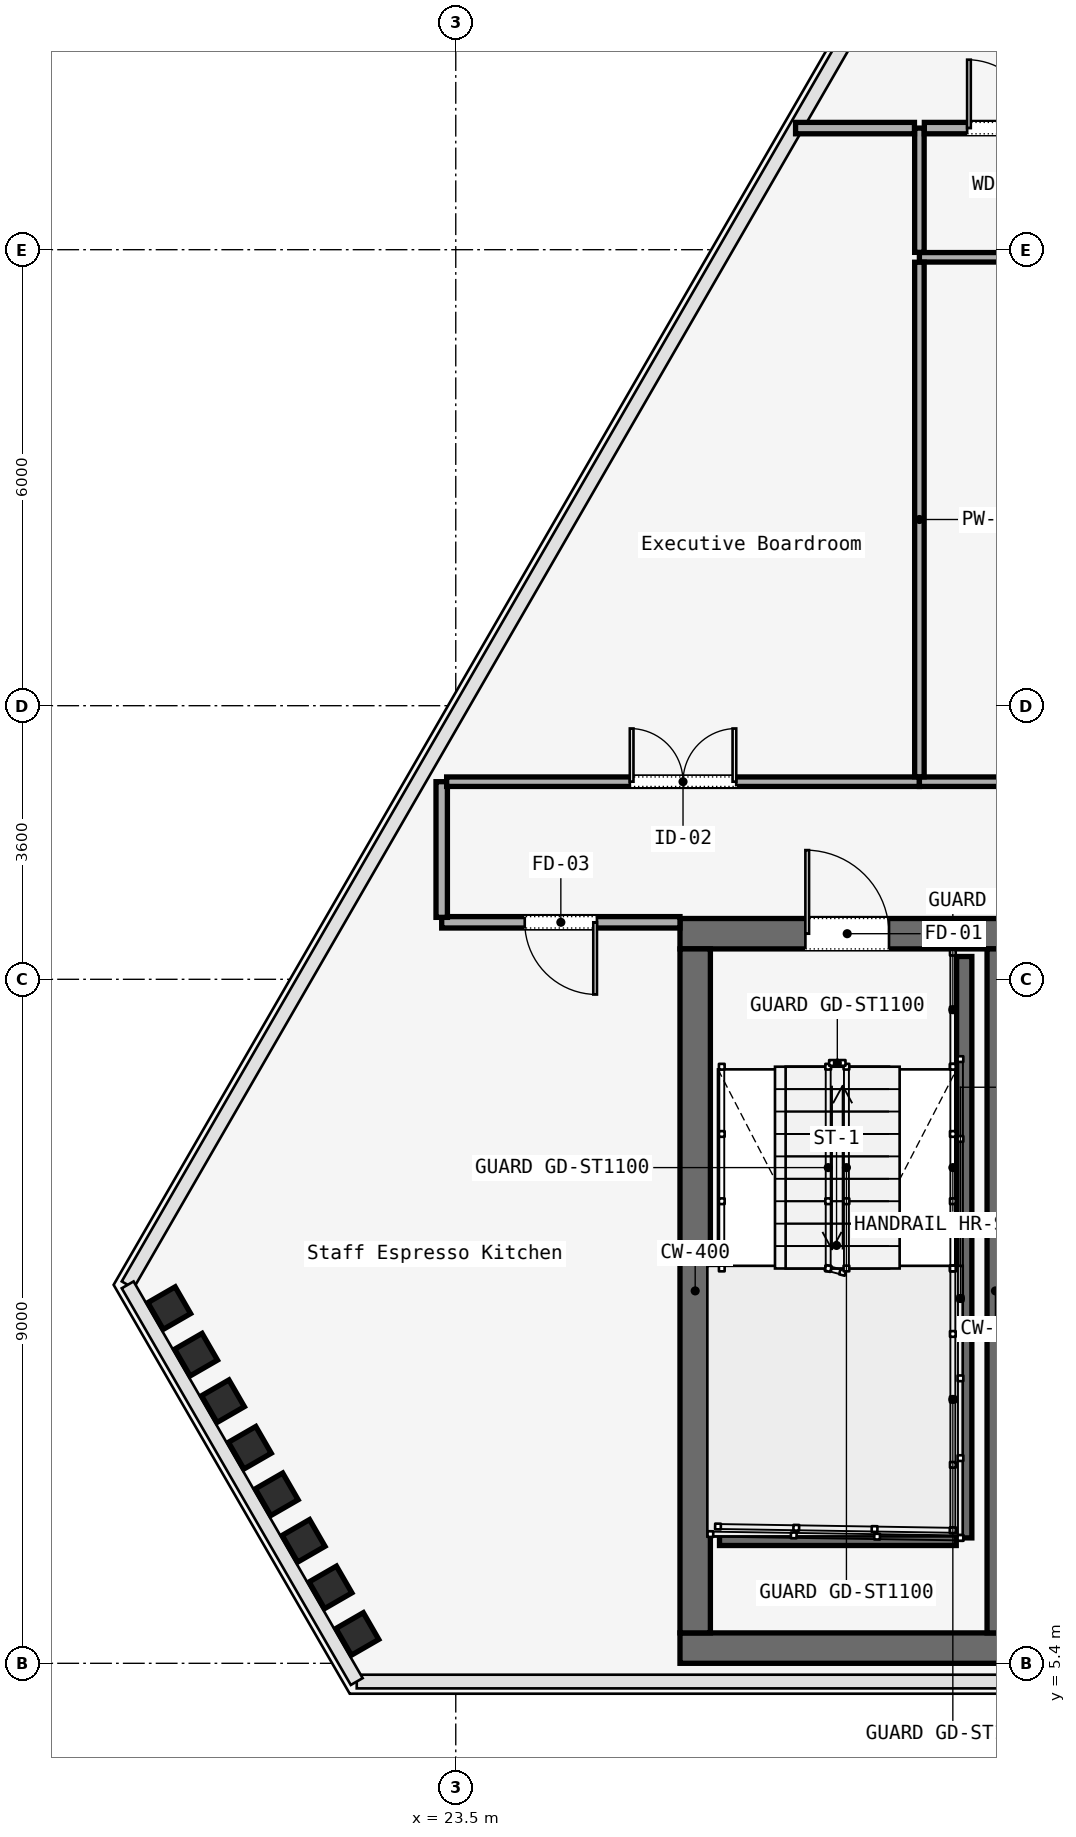
"""IFC4 building model, lengths in metres.
Left out: names, types, materials, properties, quantities, classifications, styles, units other than length and angle.
Written with IfcOpenShell. Run it as: python <this file> out.ifc"""

import sys

from ifc_helpers import new_model, si_unit, direction, frame, frame_2d, origin, origin_2d, place, context, subcontext, project, spatial, rectangle, i_section, extrude, element, fill, save


model = new_model("IFC4")
c1 = context("Model", 3, precision=1e-05, world=origin(), true_north=direction((0.0, 1.0)))
c2 = subcontext(c1, "Body", "Model", "MODEL_VIEW")
j1 = project(units=[si_unit("LENGTHUNIT", "METRE"), si_unit("PLANEANGLEUNIT", "RADIAN")], contexts=[c1])
p1 = place(None, origin())
s1 = spatial("IfcSite", under=j1, at=p1, CompositionType="ELEMENT")
p2 = place(p1, origin())
s2 = spatial("IfcBuilding", under=s1, at=p2, CompositionType="ELEMENT")
p3 = place(p2, frame((0.0, 0.0, 256.0)))
s3 = spatial("IfcBuildingStorey", under=s2, at=p3, CompositionType="ELEMENT", Elevation=256.0)
p4 = place(p3, frame((26.45, 15.0, 0.0), z_axis=(0.0, 0.0, 1.0), x_axis=(1.0, 0.0, 0.0)))
e1 = element("IfcWall", 1, at=p4, inside=s3, PredefinedType="SOLIDWALL", context=c2, shape_type="SweptSolid", body=[
    extrude(rectangle(XDim=31.1, YDim=0.4, at=frame_2d((15.55, 0.0))), origin(), (0.0, 0.0, 1.0), 3.58),
])
p5 = place(p4, frame((1.65, 0.0, 0.0)))
e2 = element("IfcOpeningElement", 2, at=p5, cuts=e1, PredefinedType="OPENING", context=c2, shape_type="SweptSolid", body=[
    extrude(rectangle(XDim=1.1, YDim=2.2, at=frame_2d((0.55, 1.1))), frame((0.0, 0.2, 0.0), z_axis=(0.0, -1.0, 0.0), x_axis=(1.0, 0.0, 0.0)), (0.0, 0.0, 1.0), 0.4),
])
p6 = place(p4, frame((13.65, 0.0, 0.0)))
e3 = element("IfcOpeningElement", 3, at=p6, cuts=e1, PredefinedType="OPENING", context=c2, shape_type="SweptSolid", body=[
    extrude(rectangle(XDim=1.1, YDim=2.2, at=frame_2d((0.55, 1.1))), frame((0.0, 0.2, 0.0), z_axis=(0.0, -1.0, 0.0), x_axis=(1.0, 0.0, 0.0)), (0.0, 0.0, 1.0), 0.4),
])
p7 = place(p4, frame((25.55, 0.0, 0.0)))
e4 = element("IfcOpeningElement", 4, at=p7, cuts=e1, PredefinedType="OPENING", context=c2, shape_type="SweptSolid", body=[
    extrude(rectangle(XDim=1.1, YDim=2.2, at=frame_2d((0.55, 1.1))), frame((0.0, 0.2, 0.0), z_axis=(0.0, -1.0, 0.0), x_axis=(1.0, 0.0, 0.0)), (0.0, 0.0, 1.0), 0.4),
])
p8 = place(p4, frame((19.35, 0.0, 0.0)))
e5 = element("IfcOpeningElement", 5, at=p8, cuts=e1, PredefinedType="OPENING", context=c2, shape_type="SweptSolid", body=[
    extrude(rectangle(XDim=1.1, YDim=2.2, at=frame_2d((0.55, 1.1))), frame((0.0, 0.2, 0.0), z_axis=(0.0, -1.0, 0.0), x_axis=(1.0, 0.0, 0.0)), (0.0, 0.0, 1.0), 0.4),
])
p9 = place(p4, frame((21.4, 0.0, 0.0)))
e6 = element("IfcOpeningElement", 6, at=p9, cuts=e1, PredefinedType="OPENING", context=c2, shape_type="SweptSolid", body=[
    extrude(rectangle(XDim=0.9, YDim=2.1, at=frame_2d((0.45, 1.05))), frame((0.0, 0.2, 0.0), z_axis=(0.0, -1.0, 0.0), x_axis=(1.0, 0.0, 0.0)), (0.0, 0.0, 1.0), 0.4),
])
p10 = place(p4, frame((6.04, 0.0, 0.0)))
e7 = element("IfcOpeningElement", 7, at=p10, cuts=e1, PredefinedType="OPENING", context=c2, shape_type="SweptSolid", body=[
    extrude(rectangle(XDim=0.95, YDim=2.2, at=frame_2d((0.475, 1.1))), frame((0.0, 0.2, 0.0), z_axis=(0.0, -1.0, 0.0), x_axis=(1.0, 0.0, 0.0)), (0.0, 0.0, 1.0), 0.4),
])
p11 = place(p4, frame((9.99, 0.0, 0.0)))
e8 = element("IfcOpeningElement", 8, at=p11, cuts=e1, PredefinedType="OPENING", context=c2, shape_type="SweptSolid", body=[
    extrude(rectangle(XDim=0.95, YDim=2.2, at=frame_2d((0.475, 1.1))), frame((0.0, 0.2, 0.0), z_axis=(0.0, -1.0, 0.0), x_axis=(1.0, 0.0, 0.0)), (0.0, 0.0, 1.0), 0.4),
])
p12 = place(p4, frame((23.35, 0.0, 0.0)))
e9 = element("IfcOpeningElement", 9, at=p12, cuts=e1, PredefinedType="OPENING", context=c2, shape_type="SweptSolid", body=[
    extrude(rectangle(XDim=1.3, YDim=2.3, at=frame_2d((0.65, 1.15))), frame((0.0, 0.2, 0.0), z_axis=(0.0, -1.0, 0.0), x_axis=(1.0, 0.0, 0.0)), (0.0, 0.0, 1.0), 0.4),
])
p13 = place(p3, frame((26.45, 5.6, 0.0), z_axis=(0.0, 0.0, 1.0), x_axis=(1.0, 0.0, 0.0)))
e10 = element("IfcWall", 10, at=p13, inside=s3, PredefinedType="SOLIDWALL", context=c2, shape_type="SweptSolid", body=[
    extrude(rectangle(XDim=31.1, YDim=0.4, at=frame_2d((15.55, 0.0))), origin(), (0.0, 0.0, 1.0), 3.58),
])
p14 = place(p3, frame((26.65, 5.8, 0.0), z_axis=(0.0, 0.0, 1.0), x_axis=(0.0, 1.0, 0.0)))
e11 = element("IfcWall", 11, at=p14, inside=s3, PredefinedType="SOLIDWALL", context=c2, shape_type="SweptSolid", body=[
    extrude(rectangle(XDim=9.0, YDim=0.4, at=frame_2d((4.5, 0.0))), origin(), (0.0, 0.0, 1.0), 3.58),
])
p15 = place(p3, frame((30.6, 5.8, 0.0), z_axis=(0.0, 0.0, 1.0), x_axis=(0.0, 1.0, 0.0)))
e12 = element("IfcWall", 12, at=p15, inside=s3, PredefinedType="SOLIDWALL", context=c2, shape_type="SweptSolid", body=[
    extrude(rectangle(XDim=9.0, YDim=0.22, at=frame_2d((4.5, 0.0))), origin(), (0.0, 0.0, 1.0), 3.58),
])
for number, where, z_axis, x_axis in (
    (13, (19.73, 10.073, 0.0), (0.0, 0.0, 1.0), (-0.5, 0.866, 0.0)),
    (14, (20.083, 9.461, 0.0), (0.0, 0.0, 1.0), (-0.5, 0.866, 0.0)),
    (15, (20.437, 8.849, 0.0), (0.0, 0.0, 1.0), (-0.5, 0.866, 0.0)),
    (16, (20.791, 8.236, 0.0), (0.0, 0.0, 1.0), (-0.5, 0.866, 0.0)),
    (17, (21.144, 7.624, 0.0), (0.0, 0.0, 1.0), (-0.5, 0.866, 0.0)),
    (18, (21.498, 7.011, 0.0), (0.0, 0.0, 1.0), (-0.5, 0.866, 0.0)),
    (19, (21.851, 6.399, 0.0), (0.0, 0.0, 1.0), (-0.5, 0.866, 0.0)),
    (20, (22.205, 5.786, 0.0), (0.0, 0.0, 1.0), (-0.5, 0.866, 0.0)),
):
    element("IfcColumn", number, at=place(p3, frame(where, z_axis=z_axis, x_axis=x_axis)), inside=s3, PredefinedType="COLUMN", context=c2, shape_type="SweptSolid", body=[
        extrude(i_section(OverallWidth=0.406, OverallDepth=0.416, WebThickness=0.03, FlangeThickness=0.037, FilletRadius=0.015, at=origin_2d()), origin(), (0.0, 0.0, 1.0), 3.58),
    ])
p16 = place(p3, frame((30.19, 14.7, 0.0), z_axis=(0.0, 0.0, 1.0), x_axis=(0.0, -1.0, 0.0)))
e21 = element("IfcWall", 21, at=p16, inside=s3, PredefinedType="SOLIDWALL", context=c2, shape_type="SweptSolid", body=[
    extrude(rectangle(XDim=7.65, YDim=0.2, at=frame_2d((3.825, 0.0))), origin(), (0.0, 0.0, 1.0), 3.8),
])
p17 = place(p3, frame((26.97, 7.05, 0.0), z_axis=(0.0, 0.0, 1.0), x_axis=(1.0, 0.0, 0.0)))
e22 = element("IfcWall", 22, at=p17, inside=s3, PredefinedType="SOLIDWALL", context=c2, shape_type="SweptSolid", body=[
    extrude(rectangle(XDim=3.115, YDim=0.2, at=frame_2d((1.558, 0.0))), origin(), (0.0, 0.0, 1.0), 3.8),
])
p18 = place(p3, frame((26.45, 15.15, 0.0), z_axis=(0.0, 0.0, 1.0), x_axis=(-1.0, 0.0, 0.0)))
e23 = element("IfcWall", 23, at=p18, inside=s3, PredefinedType="PARTITIONING", context=c2, shape_type="SweptSolid", body=[
    extrude(rectangle(XDim=3.135, YDim=0.15, at=frame_2d((1.567, 0.0))), origin(), (0.0, 0.0, 1.0), 3.01),
])
p19 = place(p18, frame((1.093, 0.0, 0.0)))
e24 = element("IfcOpeningElement", 24, at=p19, cuts=e23, PredefinedType="OPENING", context=c2, shape_type="SweptSolid", body=[
    extrude(rectangle(XDim=0.95, YDim=2.2, at=frame_2d((0.475, 1.1))), frame((0.0, 0.075, 0.0), z_axis=(0.0, -1.0, 0.0), x_axis=(1.0, 0.0, 0.0)), (0.0, 0.0, 1.0), 0.15),
])
p20 = place(p3, frame((23.315, 15.215, 0.0), z_axis=(0.0, 0.0, 1.0), x_axis=(0.0, 1.0, 0.0)))
e25 = element("IfcWall", 25, at=p20, inside=s3, PredefinedType="PARTITIONING", context=c2, shape_type="SweptSolid", body=[
    extrude(rectangle(XDim=1.785, YDim=0.15, at=frame_2d((0.893, 0.0))), origin(), (0.0, 0.0, 1.0), 3.01),
])
p21 = place(p3, frame((23.38, 17.0, 0.0), z_axis=(0.0, 0.0, 1.0), x_axis=(1.0, 0.0, 0.0)))
e26 = element("IfcWall", 26, at=p21, inside=s3, PredefinedType="PARTITIONING", context=c2, shape_type="SweptSolid", body=[
    extrude(rectangle(XDim=6.22, YDim=0.125, at=frame_2d((3.11, 0.0))), origin(), (0.0, 0.0, 1.0), 3.01),
])
p22 = place(p21, frame((2.41, 0.0, 0.0)))
e27 = element("IfcOpeningElement", 27, at=p22, cuts=e26, PredefinedType="OPENING", context=c2, shape_type="SweptSolid", body=[
    extrude(rectangle(XDim=1.4, YDim=2.2, at=frame_2d((0.7, 1.1))), frame((0.0, 0.062, 0.0), z_axis=(0.0, -1.0, 0.0), x_axis=(1.0, 0.0, 0.0)), (0.0, 0.0, 1.0), 0.125),
])
p23 = place(p3, frame((29.6, 17.0, 0.0), z_axis=(0.0, 0.0, 1.0), x_axis=(1.0, 0.0, 0.0)))
e28 = element("IfcWall", 28, at=p23, inside=s3, PredefinedType="PARTITIONING", context=c2, shape_type="SweptSolid", body=[
    extrude(rectangle(XDim=11.55, YDim=0.125, at=frame_2d((5.775, 0.0))), origin(), (0.0, 0.0, 1.0), 3.01),
])
p24 = place(p23, frame((5.3, 0.0, 0.0)))
e29 = element("IfcOpeningElement", 29, at=p24, cuts=e28, PredefinedType="OPENING", context=c2, shape_type="SweptSolid", body=[
    extrude(rectangle(XDim=0.95, YDim=2.2, at=frame_2d((0.475, 1.1))), frame((0.0, 0.062, 0.0), z_axis=(0.0, -1.0, 0.0), x_axis=(1.0, 0.0, 0.0)), (0.0, 0.0, 1.0), 0.125),
])
p25 = place(p3, frame((41.085, 23.9, 0.0), z_axis=(0.0, 0.0, 1.0), x_axis=(-1.0, 0.0, 0.0)))
e30 = element("IfcWall", 30, at=p25, inside=s3, PredefinedType="PARTITIONING", context=c2, shape_type="SweptSolid", body=[
    extrude(rectangle(XDim=11.485, YDim=0.125, at=frame_2d((5.742, 0.0))), origin(), (0.0, 0.0, 1.0), 3.01),
])
p26 = place(p3, frame((29.6, 23.965, 0.0), z_axis=(0.0, 0.0, 1.0), x_axis=(0.0, 1.0, 0.0)))
e31 = element("IfcWall", 31, at=p26, inside=s3, PredefinedType="PARTITIONING", context=c2, shape_type="SweptSolid", body=[
    extrude(rectangle(XDim=1.635, YDim=0.125, at=frame_2d((0.817, 0.0))), origin(), (0.0, 0.0, 1.0), 3.01),
])
p27 = place(p3, frame((29.665, 25.6, 0.0), z_axis=(0.0, 0.0, 1.0), x_axis=(1.0, 0.0, 0.0)))
e32 = element("IfcWall", 32, at=p27, inside=s3, PredefinedType="PARTITIONING", context=c2, shape_type="SweptSolid", body=[
    extrude(rectangle(XDim=2.026, YDim=0.15, at=frame_2d((1.013, 0.0))), origin(), (0.0, 0.0, 1.0), 3.01),
])
p28 = place(p27, frame((0.563, 0.0, 0.0)))
e33 = element("IfcOpeningElement", 33, at=p28, cuts=e32, PredefinedType="OPENING", context=c2, shape_type="SweptSolid", body=[
    extrude(rectangle(XDim=0.9, YDim=2.15, at=frame_2d((0.45, 1.075))), frame((0.0, 0.075, 0.0), z_axis=(0.0, -1.0, 0.0), x_axis=(1.0, 0.0, 0.0)), (0.0, 0.0, 1.0), 0.15),
])
p29 = place(p3, frame((29.6, 23.835, 0.0), z_axis=(0.0, 0.0, 1.0), x_axis=(0.0, -1.0, 0.0)))
e34 = element("IfcWall", 34, at=p29, inside=s3, PredefinedType="PARTITIONING", context=c2, shape_type="SweptSolid", body=[
    extrude(rectangle(XDim=6.77, YDim=0.125, at=frame_2d((3.385, 0.0))), origin(), (0.0, 0.0, 1.0), 3.01),
])
p30 = place(p3, frame((27.971, 25.6, 0.0), z_axis=(0.0, 0.0, 1.0), x_axis=(1.0, 0.0, 0.0)))
e35 = element("IfcWall", 35, at=p30, inside=s3, PredefinedType="PARTITIONING", context=c2, shape_type="SweptSolid", body=[
    extrude(rectangle(XDim=1.564, YDim=0.15, at=frame_2d((0.782, 0.0))), origin(), (0.0, 0.0, 1.0), 3.01),
])
p31 = place(p5, origin())
e36 = element("IfcDoor", 36, at=p31, inside=s3, OperationType="SINGLE_SWING_LEFT", PredefinedType="DOOR", context=c2, shape_type="SweptSolid", body=[
    extrude(rectangle(XDim=1.1, YDim=2.2, at=frame_2d((0.55, 1.1))), frame((0.0, 0.025, 0.0), z_axis=(0.0, -1.0, 0.0), x_axis=(1.0, 0.0, 0.0)), (0.0, 0.0, 1.0), 0.05),
])
fill(e2, e36)
p32 = place(p19, origin())
e37 = element("IfcDoor", 37, at=p32, inside=s3, OperationType="SINGLE_SWING_LEFT", PredefinedType="DOOR", context=c2, shape_type="SweptSolid", body=[
    extrude(rectangle(XDim=0.95, YDim=2.2, at=frame_2d((0.475, 1.1))), frame((0.0, 0.025, 0.0), z_axis=(0.0, -1.0, 0.0), x_axis=(1.0, 0.0, 0.0)), (0.0, 0.0, 1.0), 0.05),
])
fill(e24, e37)
p33 = place(p22, origin())
e38 = element("IfcDoor", 38, at=p33, inside=s3, OperationType="SINGLE_SWING_LEFT", PredefinedType="DOOR", context=c2, shape_type="SweptSolid", body=[
    extrude(rectangle(XDim=1.4, YDim=2.2, at=frame_2d((0.7, 1.1))), frame((0.0, 0.025, 0.0), z_axis=(0.0, -1.0, 0.0), x_axis=(1.0, 0.0, 0.0)), (0.0, 0.0, 1.0), 0.05),
])
fill(e27, e38)
p34 = place(p28, origin())
e39 = element("IfcDoor", 39, at=p34, inside=s3, OperationType="SINGLE_SWING_LEFT", PredefinedType="DOOR", context=c2, shape_type="SweptSolid", body=[
    extrude(rectangle(XDim=0.9, YDim=2.15, at=frame_2d((0.45, 1.075))), frame((0.0, 0.025, 0.0), z_axis=(0.0, -1.0, 0.0), x_axis=(1.0, 0.0, 0.0)), (0.0, 0.0, 1.0), 0.05),
])
fill(e33, e39)
save(model, sys.argv[1])
